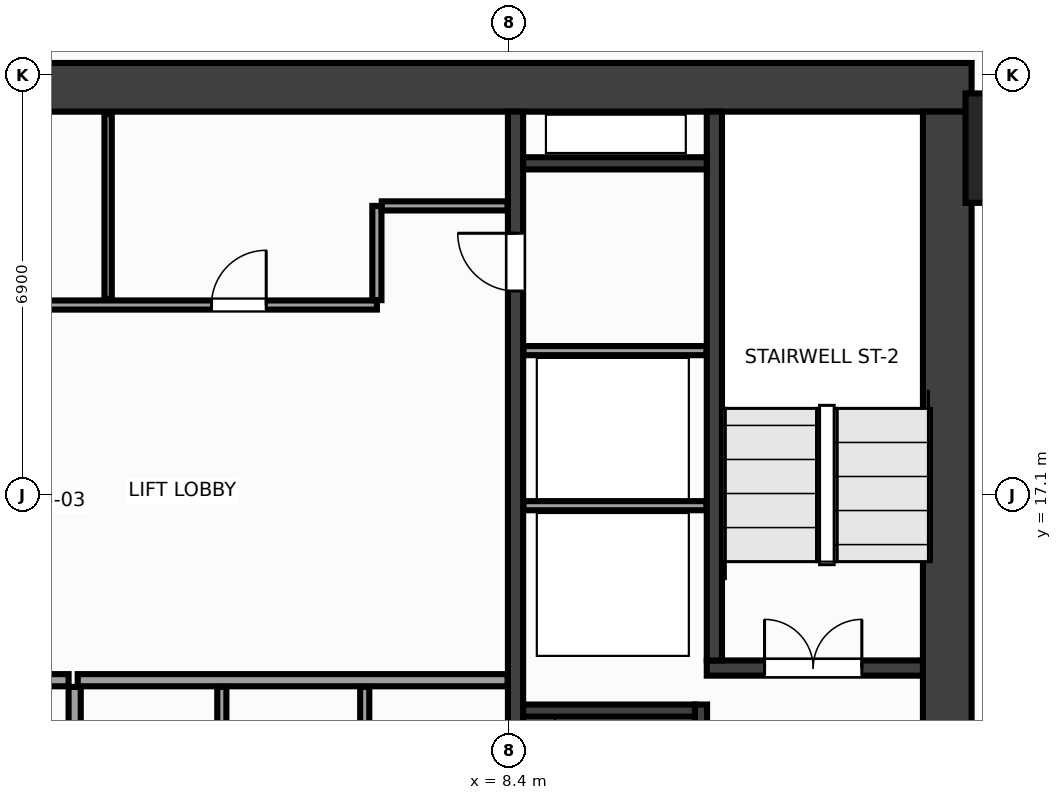
"""IFC4 building model, lengths in metres.
Left out: names, types, materials, properties, quantities, classifications, styles, units other than length and angle.
Written with IfcOpenShell. Run it as: python <this file> out.ifc"""

import sys

from ifc_helpers import new_model, si_unit, direction, frame, frame_2d, origin, origin_2d, place, context, subcontext, project, spatial, rectangle, extrude, source, transform, mapped, element, fill, save


model = new_model("IFC4")
c1 = context("Model", 3, precision=1e-05, world=origin(), true_north=direction((0.0, 1.0)))
c2 = subcontext(c1, "Body", "Model", "MODEL_VIEW")
j1 = project(units=[si_unit("LENGTHUNIT", "METRE"), si_unit("PLANEANGLEUNIT", "RADIAN")], contexts=[c1])
p1 = place(None, origin())
s1 = spatial("IfcSite", under=j1, at=p1, CompositionType="ELEMENT")
p2 = place(p1, origin())
s2 = spatial("IfcBuilding", under=s1, at=p2, CompositionType="ELEMENT")
p3 = place(p2, frame((0.0, 0.0, 38.0)))
s3 = spatial("IfcBuildingStorey", under=s2, at=p3, CompositionType="ELEMENT", Elevation=38.0)
m1 = source(origin(), c2, "Body", "SweptSolid", [
    extrude(rectangle(XDim=32.0, YDim=0.8, at=frame_2d((16.0, 0.0))), origin(), (0.0, 0.0, 1.0), 3.6),
])
p4 = place(p3, frame((-16.0, 23.8, 0.0), z_axis=(0.0, 0.0, 1.0), x_axis=(1.0, 0.0, 0.0)))
e1 = element("IfcWall", 1, at=p4, inside=s3, PredefinedType="SHEAR", context=c2, shape_type="MappedRepresentation", body=[
    mapped(m1, transform((0.0, 0.0, 0.0), x_axis=(1.0, 0.0, 0.0), y_axis=(0.0, 1.0, 0.0), z_axis=(0.0, 0.0, 1.0), scale=1.0)),
])
m2 = source(origin(), c2, "Body", "SweptSolid", [
    extrude(rectangle(XDim=12.8, YDim=0.8, at=frame_2d((6.4, 0.0))), origin(), (0.0, 0.0, 1.0), 3.6),
])
p5 = place(p3, frame((15.6, 10.6, 0.0), z_axis=(0.0, 0.0, 1.0), x_axis=(0.0, 1.0, 0.0)))
e2 = element("IfcWall", 2, at=p5, inside=s3, PredefinedType="SHEAR", context=c2, shape_type="MappedRepresentation", body=[
    mapped(m2, transform((0.0, 0.0, 0.0), x_axis=(1.0, 0.0, 0.0), y_axis=(0.0, 1.0, 0.0), z_axis=(0.0, 0.0, 1.0), scale=1.0)),
])
m3 = source(origin(), c2, "Body", "SweptSolid", [
    extrude(rectangle(XDim=12.8, YDim=0.25, at=frame_2d((6.4, 0.0))), origin(), (0.0, 0.0, 1.0), 3.6),
])
p6 = place(p3, frame((8.5, 10.6, 0.0), z_axis=(0.0, 0.0, 1.0), x_axis=(0.0, 1.0, 0.0)))
e3 = element("IfcWall", 3, at=p6, inside=s3, PredefinedType="SHEAR", context=c2, shape_type="MappedRepresentation", body=[
    mapped(m3, transform((0.0, 0.0, 0.0), x_axis=(1.0, 0.0, 0.0), y_axis=(0.0, 1.0, 0.0), z_axis=(0.0, 0.0, 1.0), scale=1.0)),
])
p7 = place(p6, frame((9.85, 0.0, 0.0)))
e4 = element("IfcOpeningElement", 4, at=p7, cuts=e3, PredefinedType="OPENING", context=c2, shape_type="SweptSolid", body=[
    extrude(rectangle(XDim=0.95, YDim=2.15, at=frame_2d((0.475, 1.075))), frame((0.0, 0.137, 0.0), z_axis=(0.0, -1.0, 0.0), x_axis=(1.0, 0.0, 0.0)), (0.0, 0.0, 1.0), 0.274),
])
m4 = source(origin(), c2, "Body", "SweptSolid", [
    extrude(rectangle(XDim=3.555, YDim=0.25, at=frame_2d((1.777, 0.0))), origin(), (0.0, 0.0, 1.0), 3.6),
])
p8 = place(p3, frame((11.645, 14.25, 0.0), z_axis=(0.0, 0.0, 1.0), x_axis=(1.0, 0.0, 0.0)))
e5 = element("IfcWall", 5, at=p8, inside=s3, PredefinedType="SHEAR", context=c2, shape_type="MappedRepresentation", body=[
    mapped(m4, transform((0.0, 0.0, 0.0), x_axis=(1.0, 0.0, 0.0), y_axis=(0.0, 1.0, 0.0), z_axis=(0.0, 0.0, 1.0), scale=1.0)),
])
p9 = place(p8, frame((0.95, 0.0, 0.0)))
e6 = element("IfcOpeningElement", 6, at=p9, cuts=e5, PredefinedType="OPENING", context=c2, shape_type="SweptSolid", body=[
    extrude(rectangle(XDim=1.6, YDim=2.15, at=frame_2d((0.8, 1.075))), frame((0.0, 0.137, 0.0), z_axis=(0.0, -1.0, 0.0), x_axis=(1.0, 0.0, 0.0)), (0.0, 0.0, 1.0), 0.274),
])
m5 = source(origin(), c2, "Body", "SweptSolid", [
    extrude(rectangle(XDim=9.025, YDim=0.25, at=frame_2d((4.512, 0.0))), origin(), (0.0, 0.0, 1.0), 3.6),
])
p10 = place(p3, frame((11.77, 14.375, 0.0), z_axis=(0.0, 0.0, 1.0), x_axis=(0.0, 1.0, 0.0)))
e7 = element("IfcWall", 7, at=p10, inside=s3, PredefinedType="SHEAR", context=c2, shape_type="MappedRepresentation", body=[
    mapped(m5, transform((0.0, 0.0, 0.0), x_axis=(1.0, 0.0, 0.0), y_axis=(0.0, 1.0, 0.0), z_axis=(0.0, 0.0, 1.0), scale=1.0)),
])
m6 = source(origin(), c2, "Body", "SweptSolid", [
    extrude(rectangle(XDim=3.05, YDim=0.2, at=frame_2d((1.525, 0.0))), origin(), (0.0, 0.0, 1.0), 3.6),
])
p11 = place(p3, frame((11.55, 10.6, 0.0), z_axis=(0.0, 0.0, 1.0), x_axis=(0.0, 1.0, 0.0)))
e8 = element("IfcWall", 8, at=p11, inside=s3, PredefinedType="SHEAR", context=c2, shape_type="MappedRepresentation", body=[
    mapped(m6, transform((0.0, 0.0, 0.0), x_axis=(1.0, 0.0, 0.0), y_axis=(0.0, 1.0, 0.0), z_axis=(0.0, 0.0, 1.0), scale=1.0)),
])
p12 = place(p11, frame((0.9, 0.0, 0.0)))
e9 = element("IfcOpeningElement", 9, at=p12, cuts=e8, PredefinedType="OPENING", context=c2, shape_type="SweptSolid", body=[
    extrude(rectangle(XDim=1.1, YDim=2.15, at=frame_2d((0.55, 1.075))), frame((0.0, 0.112, 0.0), z_axis=(0.0, -1.0, 0.0), x_axis=(1.0, 0.0, 0.0)), (0.0, 0.0, 1.0), 0.224),
])
m7 = source(origin(), c2, "Body", "SweptSolid", [
    extrude(rectangle(XDim=2.825, YDim=0.2, at=frame_2d((1.413, 0.0))), origin(), (0.0, 0.0, 1.0), 3.6),
])
p13 = place(p3, frame((8.625, 13.55, 0.0), z_axis=(0.0, 0.0, 1.0), x_axis=(1.0, 0.0, 0.0)))
e10 = element("IfcWall", 10, at=p13, inside=s3, PredefinedType="SHEAR", context=c2, shape_type="MappedRepresentation", body=[
    mapped(m7, transform((0.0, 0.0, 0.0), x_axis=(1.0, 0.0, 0.0), y_axis=(0.0, 1.0, 0.0), z_axis=(0.0, 0.0, 1.0), scale=1.0)),
])
m8 = source(origin(), c2, "Body", "SweptSolid", [
    extrude(rectangle(XDim=3.02, YDim=0.2, at=frame_2d((1.51, 0.0))), origin(), (0.0, 0.0, 1.0), 3.6),
])
p14 = place(p3, frame((8.625, 22.55, 0.0), z_axis=(0.0, 0.0, 1.0), x_axis=(1.0, 0.0, 0.0)))
e11 = element("IfcWall", 11, at=p14, inside=s3, PredefinedType="SHEAR", context=c2, shape_type="MappedRepresentation", body=[
    mapped(m8, transform((0.0, 0.0, 0.0), x_axis=(1.0, 0.0, 0.0), y_axis=(0.0, 1.0, 0.0), z_axis=(0.0, 0.0, 1.0), scale=1.0)),
])
m9 = source(origin(), c2, "Body", "SweptSolid", [
    extrude(rectangle(XDim=1.8, YDim=1.8, at=origin_2d()), origin(), (0.0, 0.0, 1.0), 3.6),
])
p15 = place(p3, frame((16.8, 22.8, 0.0), z_axis=(0.0, 0.0, 1.0), x_axis=(1.0, 0.0, 0.0)))
e12 = element("IfcColumn", 12, at=p15, inside=s3, PredefinedType="COLUMN", context=c2, shape_type="MappedRepresentation", body=[
    mapped(m9, transform((0.0, 0.0, 0.0), x_axis=(1.0, 0.0, 0.0), y_axis=(0.0, 1.0, 0.0), z_axis=(0.0, 0.0, 1.0), scale=1.0)),
])
m10 = source(origin(), c2, "Body", "SweptSolid", [
    extrude(rectangle(XDim=3.01, YDim=0.15, at=frame_2d((1.505, 0.0))), origin(), (0.0, 0.0, 1.0), 3.36),
])
for number, where, z_axis, x_axis in (
    (13, (8.63, 16.92, 0.0), (0.0, 0.0, 1.0), (1.0, 0.0, 0.0)),
    (14, (8.63, 19.47, 0.0), (0.0, 0.0, 1.0), (1.0, 0.0, 0.0)),
):
    element("IfcWall", number, at=place(p3, frame(where, z_axis=z_axis, x_axis=x_axis)), inside=s3, PredefinedType="PARTITIONING", context=c2, shape_type="MappedRepresentation", body=[
        mapped(m10, transform((0.0, 0.0, 0.0), x_axis=(1.0, 0.0, 0.0), y_axis=(0.0, 1.0, 0.0), z_axis=(0.0, 0.0, 1.0), scale=1.0)),
    ])
m11 = source(origin(), c2, "Body", "SweptSolid", [
    extrude(rectangle(XDim=7.07, YDim=0.2, at=frame_2d((3.535, 0.0))), origin(), (0.0, 0.0, 1.0), 3.36),
])
p16 = place(p3, frame((1.3, 14.05, 0.0), z_axis=(0.0, 0.0, 1.0), x_axis=(1.0, 0.0, 0.0)))
e15 = element("IfcWall", 15, at=p16, inside=s3, PredefinedType="PARTITIONING", context=c2, shape_type="MappedRepresentation", body=[
    mapped(m11, transform((0.0, 0.0, 0.0), x_axis=(1.0, 0.0, 0.0), y_axis=(0.0, 1.0, 0.0), z_axis=(0.0, 0.0, 1.0), scale=1.0)),
])
m12 = source(origin(), c2, "Body", "SweptSolid", [
    extrude(rectangle(XDim=3.34, YDim=0.2, at=frame_2d((1.67, 0.0))), origin(), (0.0, 0.0, 1.0), 3.36),
])
p17 = place(p3, frame((1.25, 10.6, 0.0), z_axis=(0.0, 0.0, 1.0), x_axis=(0.0, 1.0, 0.0)))
e16 = element("IfcWall", 16, at=p17, inside=s3, PredefinedType="PARTITIONING", context=c2, shape_type="MappedRepresentation", body=[
    mapped(m12, transform((0.0, 0.0, 0.0), x_axis=(1.0, 0.0, 0.0), y_axis=(0.0, 1.0, 0.0), z_axis=(0.0, 0.0, 1.0), scale=1.0)),
])
m13 = source(origin(), c2, "Body", "SweptSolid", [
    extrude(rectangle(XDim=2.3, YDim=0.2, at=frame_2d((1.15, 0.0))), origin(), (0.0, 0.0, 1.0), 3.36),
])
p18 = place(p3, frame((-1.15, 14.05, 0.0), z_axis=(0.0, 0.0, 1.0), x_axis=(1.0, 0.0, 0.0)))
e17 = element("IfcWall", 17, at=p18, inside=s3, PredefinedType="PARTITIONING", context=c2, shape_type="MappedRepresentation", body=[
    mapped(m13, transform((0.0, 0.0, 0.0), x_axis=(1.0, 0.0, 0.0), y_axis=(0.0, 1.0, 0.0), z_axis=(0.0, 0.0, 1.0), scale=1.0)),
])
p19 = place(p18, frame((0.4, 0.0, 0.0)))
e18 = element("IfcOpeningElement", 18, at=p19, cuts=e17, PredefinedType="OPENING", context=c2, shape_type="SweptSolid", body=[
    extrude(rectangle(XDim=1.5, YDim=2.2, at=frame_2d((0.75, 1.1))), frame((0.0, 0.112, 0.0), z_axis=(0.0, -1.0, 0.0), x_axis=(1.0, 0.0, 0.0)), (0.0, 0.0, 1.0), 0.224),
])
m14 = source(origin(), c2, "Body", "SweptSolid", [
    extrude(rectangle(XDim=14.59, YDim=0.15, at=frame_2d((7.295, 0.0))), origin(), (0.0, 0.0, 1.0), 3.36),
])
p20 = place(p3, frame((-8.37, 20.22, 0.0), z_axis=(0.0, 0.0, 1.0), x_axis=(1.0, 0.0, 0.0)))
e19 = element("IfcWall", 19, at=p20, inside=s3, PredefinedType="PARTITIONING", context=c2, shape_type="MappedRepresentation", body=[
    mapped(m14, transform((0.0, 0.0, 0.0), x_axis=(1.0, 0.0, 0.0), y_axis=(0.0, 1.0, 0.0), z_axis=(0.0, 0.0, 1.0), scale=1.0)),
])
p21 = place(p20, frame((1.06, 0.0, 0.0)))
e20 = element("IfcOpeningElement", 20, at=p21, cuts=e19, PredefinedType="OPENING", context=c2, shape_type="SweptSolid", body=[
    extrude(rectangle(XDim=0.9, YDim=2.15, at=frame_2d((0.45, 1.075))), frame((0.0, 0.087, 0.0), z_axis=(0.0, -1.0, 0.0), x_axis=(1.0, 0.0, 0.0)), (0.0, 0.0, 1.0), 0.174),
])
p22 = place(p20, frame((4.22, 0.0, 0.0)))
e21 = element("IfcOpeningElement", 21, at=p22, cuts=e19, PredefinedType="OPENING", context=c2, shape_type="SweptSolid", body=[
    extrude(rectangle(XDim=0.9, YDim=2.15, at=frame_2d((0.45, 1.075))), frame((0.0, 0.087, 0.0), z_axis=(0.0, -1.0, 0.0), x_axis=(1.0, 0.0, 0.0)), (0.0, 0.0, 1.0), 0.174),
])
p23 = place(p20, frame((7.82, 0.0, 0.0)))
e22 = element("IfcOpeningElement", 22, at=p23, cuts=e19, PredefinedType="OPENING", context=c2, shape_type="SweptSolid", body=[
    extrude(rectangle(XDim=0.9, YDim=2.15, at=frame_2d((0.45, 1.075))), frame((0.0, 0.087, 0.0), z_axis=(0.0, -1.0, 0.0), x_axis=(1.0, 0.0, 0.0)), (0.0, 0.0, 1.0), 0.174),
])
p24 = place(p20, frame((11.87, 0.0, 0.0)))
e23 = element("IfcOpeningElement", 23, at=p24, cuts=e19, PredefinedType="OPENING", context=c2, shape_type="SweptSolid", body=[
    extrude(rectangle(XDim=0.9, YDim=2.15, at=frame_2d((0.45, 1.075))), frame((0.0, 0.087, 0.0), z_axis=(0.0, -1.0, 0.0), x_axis=(1.0, 0.0, 0.0)), (0.0, 0.0, 1.0), 0.174),
])
m15 = source(origin(), c2, "Body", "SweptSolid", [
    extrude(rectangle(XDim=1.55, YDim=0.15, at=frame_2d((0.775, 0.0))), origin(), (0.0, 0.0, 1.0), 3.36),
])
p25 = place(p3, frame((6.22, 20.3, 0.0), z_axis=(0.0, 0.0, 1.0), x_axis=(0.0, 1.0, 0.0)))
e24 = element("IfcWall", 24, at=p25, inside=s3, PredefinedType="PARTITIONING", context=c2, shape_type="MappedRepresentation", body=[
    mapped(m15, transform((0.0, 0.0, 0.0), x_axis=(1.0, 0.0, 0.0), y_axis=(0.0, 1.0, 0.0), z_axis=(0.0, 0.0, 1.0), scale=1.0)),
])
m16 = source(origin(), c2, "Body", "SweptSolid", [
    extrude(rectangle(XDim=2.07, YDim=0.15, at=frame_2d((1.035, 0.0))), origin(), (0.0, 0.0, 1.0), 3.36),
])
p26 = place(p3, frame((6.3, 21.85, 0.0), z_axis=(0.0, 0.0, 1.0), x_axis=(1.0, 0.0, 0.0)))
e25 = element("IfcWall", 25, at=p26, inside=s3, PredefinedType="PARTITIONING", context=c2, shape_type="MappedRepresentation", body=[
    mapped(m16, transform((0.0, 0.0, 0.0), x_axis=(1.0, 0.0, 0.0), y_axis=(0.0, 1.0, 0.0), z_axis=(0.0, 0.0, 1.0), scale=1.0)),
])
m17 = source(origin(), c2, "Body", "SweptSolid", [
    extrude(rectangle(XDim=3.34, YDim=0.15, at=frame_2d((1.67, 0.0))), origin(), (0.0, 0.0, 1.0), 3.36),
])
for number, where, z_axis, x_axis in (
    (26, (3.67, 10.6, 0.0), (0.0, 0.0, 1.0), (0.0, 1.0, 0.0)),
    (27, (6.02, 10.6, 0.0), (0.0, 0.0, 1.0), (0.0, 1.0, 0.0)),
):
    element("IfcWall", number, at=place(p3, frame(where, z_axis=z_axis, x_axis=x_axis)), inside=s3, PredefinedType="PARTITIONING", context=c2, shape_type="MappedRepresentation", body=[
        mapped(m17, transform((0.0, 0.0, 0.0), x_axis=(1.0, 0.0, 0.0), y_axis=(0.0, 1.0, 0.0), z_axis=(0.0, 0.0, 1.0), scale=1.0)),
    ])
m18 = source(origin(), c2, "Body", "SweptSolid", [
    extrude(rectangle(XDim=3.04, YDim=0.12, at=frame_2d((1.52, 0.0))), origin(), (0.0, 0.0, 1.0), 3.36),
])
p27 = place(p3, frame((1.8, 20.32, 0.0), z_axis=(0.0, 0.0, 1.0), x_axis=(0.0, 1.0, 0.0)))
e28 = element("IfcWall", 28, at=p27, inside=s3, PredefinedType="PARTITIONING", context=c2, shape_type="MappedRepresentation", body=[
    mapped(m18, transform((0.0, 0.0, 0.0), x_axis=(1.0, 0.0, 0.0), y_axis=(0.0, 1.0, 0.0), z_axis=(0.0, 0.0, 1.0), scale=1.0)),
])
m19 = source(origin(), c2, "Body", "SweptSolid", [
    extrude(rectangle(XDim=1.6, YDim=2.15, at=frame_2d((0.8, 1.075))), frame((0.0, 0.025, 0.0), z_axis=(0.0, -1.0, 0.0), x_axis=(1.0, 0.0, 0.0)), (0.0, 0.0, 1.0), 0.05),
])
p28 = place(p9, origin())
e29 = element("IfcDoor", 29, at=p28, inside=s3, OperationType="DOUBLE_DOOR_SINGLE_SWING", PredefinedType="DOOR", context=c2, shape_type="MappedRepresentation", body=[
    mapped(m19, transform((0.0, 0.0, 0.0), x_axis=(1.0, 0.0, 0.0), y_axis=(0.0, 1.0, 0.0), z_axis=(0.0, 0.0, 1.0), scale=1.0)),
])
fill(e6, e29)
m20 = source(origin(), c2, "Body", "SweptSolid", [
    extrude(rectangle(XDim=0.95, YDim=2.15, at=frame_2d((0.475, 1.075))), frame((0.0, 0.025, 0.0), z_axis=(0.0, -1.0, 0.0), x_axis=(1.0, 0.0, 0.0)), (0.0, 0.0, 1.0), 0.05),
])
p29 = place(p7, origin())
e30 = element("IfcDoor", 30, at=p29, inside=s3, OperationType="SINGLE_SWING_RIGHT", PredefinedType="DOOR", context=c2, shape_type="MappedRepresentation", body=[
    mapped(m20, transform((0.0, 0.0, 0.0), x_axis=(1.0, 0.0, 0.0), y_axis=(0.0, 1.0, 0.0), z_axis=(0.0, 0.0, 1.0), scale=1.0)),
])
fill(e4, e30)
m21 = source(origin(), c2, "Body", "SweptSolid", [
    extrude(rectangle(XDim=0.9, YDim=2.15, at=frame_2d((0.45, 1.075))), frame((0.0, 0.025, 0.0), z_axis=(0.0, -1.0, 0.0), x_axis=(1.0, 0.0, 0.0)), (0.0, 0.0, 1.0), 0.05),
])
p30 = place(p24, origin())
e31 = element("IfcDoor", 31, at=p30, inside=s3, OperationType="SINGLE_SWING_RIGHT", PredefinedType="DOOR", context=c2, shape_type="MappedRepresentation", body=[
    mapped(m21, transform((0.0, 0.0, 0.0), x_axis=(1.0, 0.0, 0.0), y_axis=(0.0, 1.0, 0.0), z_axis=(0.0, 0.0, 1.0), scale=1.0)),
])
fill(e23, e31)
save(model, sys.argv[1])
